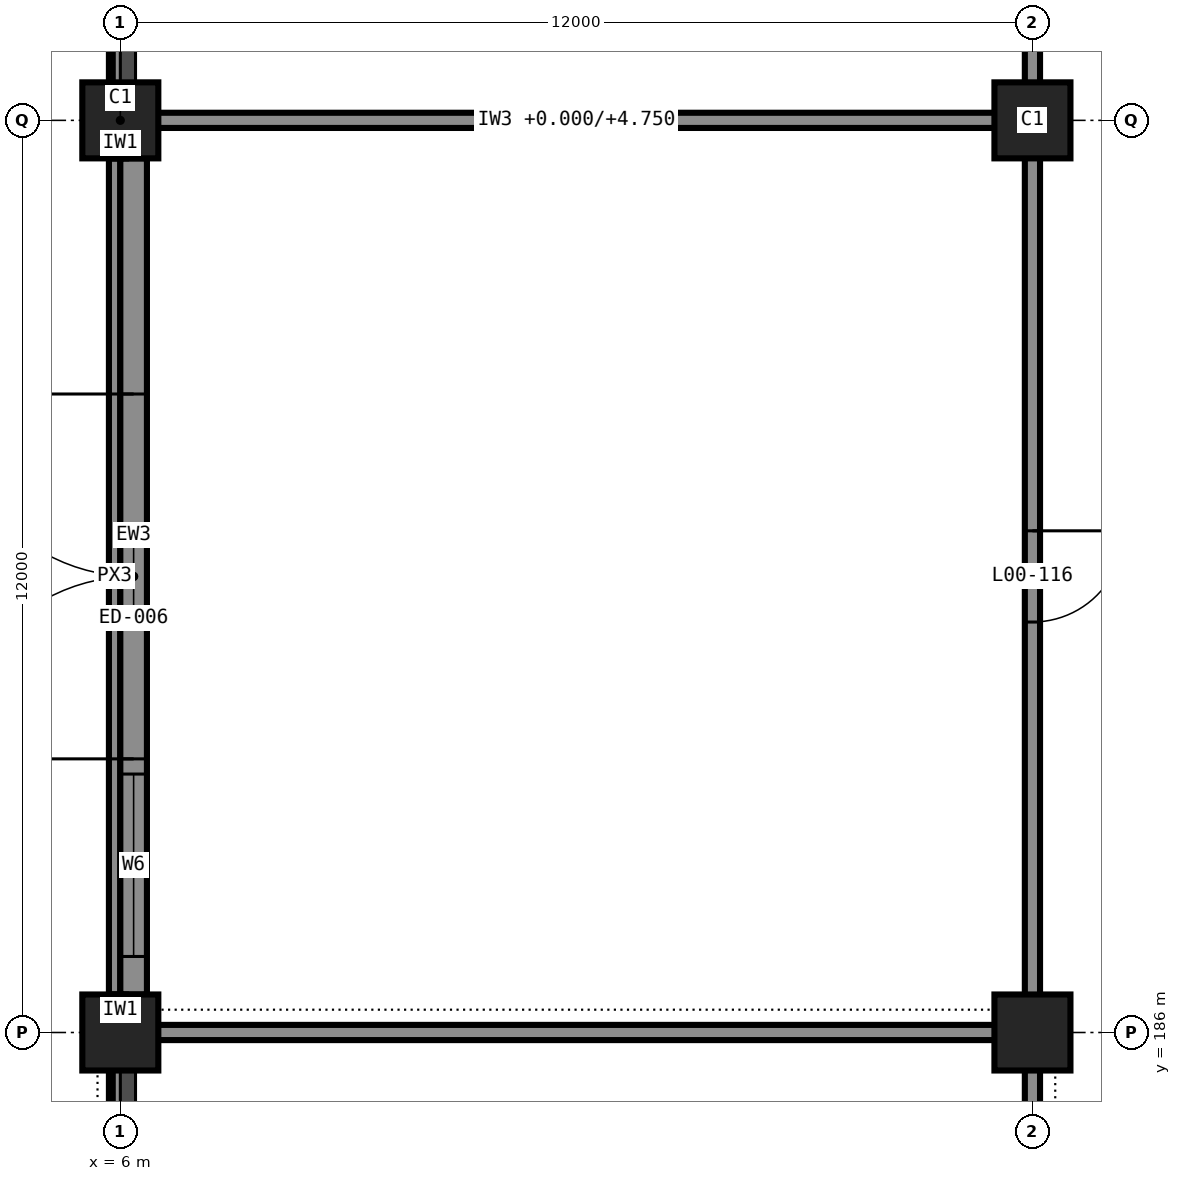
"""IFC4 building model, lengths in metres.
Left out: names, types, materials, properties, quantities, classifications, styles, units other than length and angle.
Written with IfcOpenShell. Run it as: python <this file> out.ifc"""

import sys

from ifc_helpers import new_model, si_unit, direction, frame, frame_2d, origin, origin_2d, place, context, subcontext, project, spatial, rectangle, extrude, element, fill, save


model = new_model("IFC4")
c1 = context("Model", 3, precision=1e-05, world=origin(), true_north=direction((0.0, 1.0)))
c2 = subcontext(c1, "Body", "Model", "MODEL_VIEW")
j1 = project(units=[si_unit("LENGTHUNIT", "METRE"), si_unit("PLANEANGLEUNIT", "RADIAN")], contexts=[c1])
p1 = place(None, origin())
s1 = spatial("IfcSite", under=j1, at=p1, CompositionType="ELEMENT")
p2 = place(p1, origin())
s2 = spatial("IfcBuilding", under=s1, at=p2, CompositionType="ELEMENT")
p3 = place(p2, origin())
s3 = spatial("IfcBuildingStorey", under=s2, at=p3, CompositionType="ELEMENT", Elevation=0.0)
for number, where, z_axis, x_axis in (
    (1, (6.0, 186.0, 0.0), (0.0, 0.0, 1.0), (1.0, 0.0, 0.0)),
    (2, (6.0, 198.0, 0.0), (0.0, 0.0, 1.0), (1.0, 0.0, 0.0)),
    (3, (18.0, 186.0, 0.0), (0.0, 0.0, 1.0), (1.0, 0.0, 0.0)),
    (4, (18.0, 198.0, 0.0), (0.0, 0.0, 1.0), (1.0, 0.0, 0.0)),
):
    element("IfcColumn", number, at=place(p3, frame(where, z_axis=z_axis, x_axis=x_axis)), inside=s3, PredefinedType="COLUMN", context=c2, shape_type="SweptSolid", body=[
        extrude(rectangle(XDim=1.0, YDim=1.0, at=origin_2d()), origin(), (0.0, 0.0, 1.0), 6.0),
    ])
p4 = place(p3, frame((5.925, 206.4, 5.75), z_axis=(0.0, 0.0, 1.0), x_axis=(0.0, -1.0, 0.0)))
e5 = element("IfcWall", 5, at=p4, inside=s3, PredefinedType="STANDARD", context=c2, shape_type="SweptSolid", body=[
    extrude(rectangle(XDim=7.9, YDim=0.15, at=frame_2d((3.95, 0.0))), origin(), (0.0, 0.0, 1.0), 0.25),
])
p5 = place(p3, frame((6.175, 197.5, 0.0), z_axis=(0.0, 0.0, 1.0), x_axis=(0.0, -1.0, 0.0)))
e6 = element("IfcWall", 6, at=p5, inside=s3, PredefinedType="STANDARD", context=c2, shape_type="SweptSolid", body=[
    extrude(rectangle(XDim=11.0, YDim=0.35, at=frame_2d((5.5, 0.0))), origin(), (0.0, 0.0, 1.0), 4.75),
])
p6 = place(p5, frame((8.1, 0.0, 0.45)))
e7 = element("IfcOpeningElement", 7, at=p6, cuts=e6, PredefinedType="OPENING", context=c2, shape_type="SweptSolid", body=[
    extrude(rectangle(XDim=2.4, YDim=3.0, at=frame_2d((1.2, 1.5))), frame((0.0, 0.185, 0.0), z_axis=(0.0, -1.0, 0.0), x_axis=(1.0, 0.0, 0.0)), (0.0, 0.0, 1.0), 0.37),
])
p7 = place(p5, frame((3.1, 0.0, 0.0)))
e8 = element("IfcOpeningElement", 8, at=p7, cuts=e6, PredefinedType="OPENING", context=c2, shape_type="SweptSolid", body=[
    extrude(rectangle(XDim=4.8, YDim=2.4, at=frame_2d((2.4, 1.2))), frame((0.0, 0.185, 0.0), z_axis=(0.0, -1.0, 0.0), x_axis=(1.0, 0.0, 0.0)), (0.0, 0.0, 1.0), 0.37),
])
for number, where, z_axis, x_axis in (
    (9, (5.925, 197.5, 5.75), (0.0, 0.0, 1.0), (0.0, -1.0, 0.0)),
    (10, (5.925, 185.5, 5.75), (0.0, 0.0, 1.0), (0.0, -1.0, 0.0)),
):
    element("IfcWall", number, at=place(p3, frame(where, z_axis=z_axis, x_axis=x_axis)), inside=s3, PredefinedType="STANDARD", context=c2, shape_type="SweptSolid", body=[
        extrude(rectangle(XDim=11.0, YDim=0.15, at=frame_2d((5.5, 0.0))), origin(), (0.0, 0.0, 1.0), 0.25),
    ])
p8 = place(p3, frame((5.925, 186.0, 0.0), z_axis=(0.0, 0.0, 1.0), x_axis=(1.0, 0.0, 0.0)))
e11 = element("IfcWall", 11, at=p8, inside=s3, PredefinedType="PARTITIONING", context=c2, shape_type="SweptSolid", body=[
    extrude(rectangle(XDim=11.975, YDim=0.2, at=frame_2d((5.987, 0.0))), origin(), (0.0, 0.0, 1.0), 4.75),
])
p9 = place(p3, frame((5.9, 198.0, 0.0), z_axis=(0.0, 0.0, 1.0), x_axis=(1.0, 0.0, 0.0)))
e12 = element("IfcWall", 12, at=p9, inside=s3, PredefinedType="PARTITIONING", context=c2, shape_type="SweptSolid", body=[
    extrude(rectangle(XDim=12.2, YDim=0.2, at=frame_2d((6.1, 0.0))), origin(), (0.0, 0.0, 1.0), 4.75),
])
p10 = place(p3, frame((6.0, 183.6, 0.0), z_axis=(0.0, 0.0, 1.0), x_axis=(0.0, 1.0, 0.0)))
e13 = element("IfcWall", 13, at=p10, inside=s3, PredefinedType="PARTITIONING", context=c2, shape_type="SweptSolid", body=[
    extrude(rectangle(XDim=2.3, YDim=0.2, at=frame_2d((1.15, 0.0))), origin(), (0.0, 0.0, 1.0), 4.75),
])
for number, where, z_axis, x_axis in (
    (14, (6.0, 186.1, 0.0), (0.0, 0.0, 1.0), (0.0, 1.0, 0.0)),
    (15, (6.0, 197.5, 0.0), (0.0, 0.0, 1.0), (0.0, 1.0, 0.0)),
):
    element("IfcWall", number, at=place(p3, frame(where, z_axis=z_axis, x_axis=x_axis)), inside=s3, PredefinedType="PARTITIONING", context=c2, shape_type="SweptSolid", body=[
        extrude(rectangle(XDim=0.4, YDim=0.15, at=frame_2d((0.2, 0.0))), origin(), (0.0, 0.0, 1.0), 5.75),
    ])
p11 = place(p3, frame((6.0, 198.1, 0.0), z_axis=(0.0, 0.0, 1.0), x_axis=(0.0, 1.0, 0.0)))
e16 = element("IfcWall", 16, at=p11, inside=s3, PredefinedType="PARTITIONING", context=c2, shape_type="SweptSolid", body=[
    extrude(rectangle(XDim=5.8, YDim=0.2, at=frame_2d((2.9, 0.0))), origin(), (0.0, 0.0, 1.0), 4.75),
])
p12 = place(p3, frame((18.0, 162.0, 0.0), z_axis=(0.0, 0.0, 1.0), x_axis=(0.0, 1.0, 0.0)))
e17 = element("IfcWall", 17, at=p12, inside=s3, PredefinedType="PARTITIONING", context=c2, shape_type="SweptSolid", body=[
    extrude(rectangle(XDim=35.9, YDim=0.2, at=frame_2d((17.95, 0.0))), origin(), (0.0, 0.0, 1.0), 4.75),
])
p13 = place(p12, frame((1.2, 0.0, 0.0)))
e18 = element("IfcOpeningElement", 18, at=p13, cuts=e17, PredefinedType="OPENING", context=c2, shape_type="SweptSolid", body=[
    extrude(rectangle(XDim=1.2, YDim=2.1, at=frame_2d((0.6, 1.05))), frame((0.0, 0.11, 0.0), z_axis=(0.0, -1.0, 0.0), x_axis=(1.0, 0.0, 0.0)), (0.0, 0.0, 1.0), 0.22),
])
p14 = place(p12, frame((12.9, 0.0, 0.0)))
e19 = element("IfcOpeningElement", 19, at=p14, cuts=e17, PredefinedType="OPENING", context=c2, shape_type="SweptSolid", body=[
    extrude(rectangle(XDim=1.2, YDim=2.1, at=frame_2d((0.6, 1.05))), frame((0.0, 0.11, 0.0), z_axis=(0.0, -1.0, 0.0), x_axis=(1.0, 0.0, 0.0)), (0.0, 0.0, 1.0), 0.22),
])
p15 = place(p12, frame((19.2, 0.0, 0.0)))
e20 = element("IfcOpeningElement", 20, at=p15, cuts=e17, PredefinedType="OPENING", context=c2, shape_type="SweptSolid", body=[
    extrude(rectangle(XDim=1.2, YDim=2.1, at=frame_2d((0.6, 1.05))), frame((0.0, 0.11, 0.0), z_axis=(0.0, -1.0, 0.0), x_axis=(1.0, 0.0, 0.0)), (0.0, 0.0, 1.0), 0.22),
])
p16 = place(p12, frame((29.4, 0.0, 0.0)))
e21 = element("IfcOpeningElement", 21, at=p16, cuts=e17, PredefinedType="OPENING", context=c2, shape_type="SweptSolid", body=[
    extrude(rectangle(XDim=1.2, YDim=2.1, at=frame_2d((0.6, 1.05))), frame((0.0, 0.11, 0.0), z_axis=(0.0, -1.0, 0.0), x_axis=(1.0, 0.0, 0.0)), (0.0, 0.0, 1.0), 0.22),
])
p17 = place(p3, frame((18.0, 198.1, 0.0), z_axis=(0.0, 0.0, 1.0), x_axis=(0.0, 1.0, 0.0)))
e22 = element("IfcWall", 22, at=p17, inside=s3, PredefinedType="PARTITIONING", context=c2, shape_type="SweptSolid", body=[
    extrude(rectangle(XDim=5.8, YDim=0.2, at=frame_2d((2.9, 0.0))), origin(), (0.0, 0.0, 1.0), 4.75),
])
p18 = place(p17, frame((2.4, 0.0, 0.0)))
e23 = element("IfcOpeningElement", 23, at=p18, cuts=e22, PredefinedType="OPENING", context=c2, shape_type="SweptSolid", body=[
    extrude(rectangle(XDim=1.0, YDim=2.1, at=frame_2d((0.5, 1.05))), frame((0.0, 0.11, 0.0), z_axis=(0.0, -1.0, 0.0), x_axis=(1.0, 0.0, 0.0)), (0.0, 0.0, 1.0), 0.22),
])
p19 = place(p6, origin())
e24 = element("IfcWindow", 24, at=p19, inside=s3, PartitioningType="SINGLE_PANEL", PredefinedType="WINDOW", context=c2, shape_type="SweptSolid", body=[
    extrude(rectangle(XDim=2.4, YDim=3.0, at=frame_2d((1.2, 1.5))), frame((0.0, 0.03, 0.0), z_axis=(0.0, -1.0, 0.0), x_axis=(1.0, 0.0, 0.0)), (0.0, 0.0, 1.0), 0.06),
])
fill(e7, e24)
p20 = place(p7, frame((4.8, 0.0, 0.0), z_axis=(0.0, 0.0, 1.0), x_axis=(-1.0, 0.0, 0.0)))
e25 = element("IfcDoor", 25, at=p20, inside=s3, OperationType="DOUBLE_DOOR_SINGLE_SWING", PredefinedType="DOOR", context=c2, shape_type="SweptSolid", body=[
    extrude(rectangle(XDim=4.8, YDim=2.4, at=frame_2d((2.4, 1.2))), frame((0.0, 0.025, 0.0), z_axis=(0.0, -1.0, 0.0), x_axis=(1.0, 0.0, 0.0)), (0.0, 0.0, 1.0), 0.05),
])
fill(e8, e25)
p21 = place(p16, frame((1.2, 0.0, 0.0), z_axis=(0.0, 0.0, 1.0), x_axis=(-1.0, 0.0, 0.0)))
e26 = element("IfcDoor", 26, at=p21, inside=s3, OperationType="SINGLE_SWING_RIGHT", PredefinedType="DOOR", context=c2, shape_type="SweptSolid", body=[
    extrude(rectangle(XDim=1.2, YDim=2.1, at=frame_2d((0.6, 1.05))), frame((0.0, 0.025, 0.0), z_axis=(0.0, -1.0, 0.0), x_axis=(1.0, 0.0, 0.0)), (0.0, 0.0, 1.0), 0.05),
])
fill(e21, e26)
save(model, sys.argv[1])
